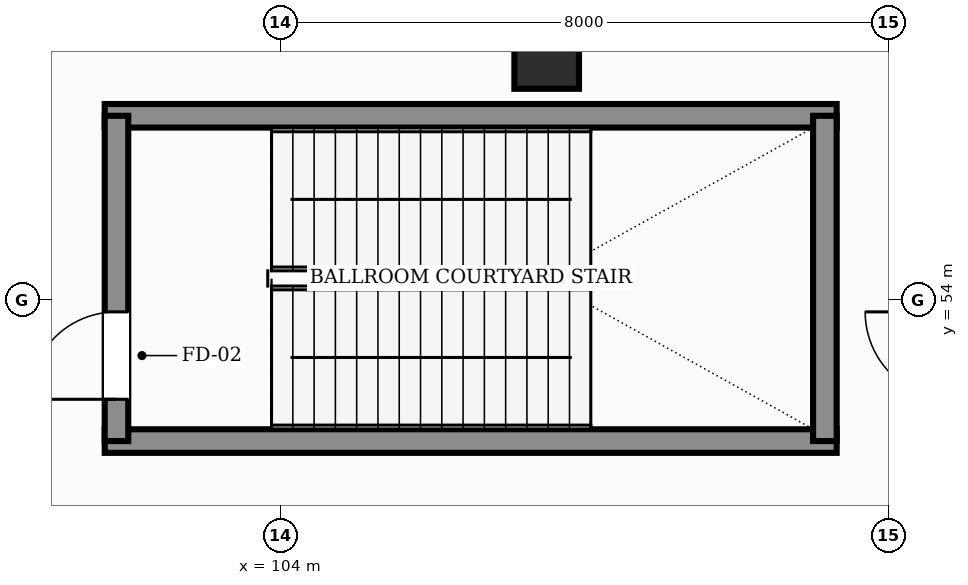
"""IFC4 building model, lengths in metres.
Left out: names, types, materials, properties, quantities, classifications, styles, units other than length and angle.
Written with IfcOpenShell. Run it as: python <this file> out.ifc"""

import sys

from ifc_helpers import new_model, si_unit, direction, frame, frame_2d, origin, origin_2d, place, context, subcontext, project, spatial, rectangle, extrude, element, fill, save


model = new_model("IFC4")
c1 = context("Model", 3, precision=1e-05, world=origin(), true_north=direction((0.0, 1.0)))
c2 = subcontext(c1, "Body", "Model", "MODEL_VIEW")
j1 = project(units=[si_unit("LENGTHUNIT", "METRE"), si_unit("PLANEANGLEUNIT", "RADIAN")], contexts=[c1])
p1 = place(None, origin())
s1 = spatial("IfcSite", under=j1, at=p1, CompositionType="ELEMENT")
p2 = place(p1, origin())
s2 = spatial("IfcBuilding", under=s1, at=p2, CompositionType="ELEMENT")
p3 = place(p2, origin())
s3 = spatial("IfcBuildingStorey", under=s2, at=p3, CompositionType="ELEMENT", Elevation=0.0)
p4 = place(p3, frame((107.5, 57.2, 0.0), z_axis=(0.0, 0.0, 1.0), x_axis=(1.0, 0.0, 0.0)))
e1 = element("IfcColumn", 1, at=p4, inside=s3, PredefinedType="COLUMN", context=c2, shape_type="SweptSolid", body=[
    extrude(rectangle(XDim=0.85, YDim=0.85, at=origin_2d()), origin(), (0.0, 0.0, 1.0), 6.0),
])
for number, where, z_axis, x_axis in (
    (2, (101.685, 52.14, 0.0), (0.0, 0.0, 1.0), (1.0, 0.0, 0.0)),
    (3, (101.685, 56.42, 0.0), (0.0, 0.0, 1.0), (1.0, 0.0, 0.0)),
):
    element("IfcWall", number, at=place(p3, frame(where, z_axis=z_axis, x_axis=x_axis)), inside=s3, PredefinedType="SHEAR", context=c2, shape_type="SweptSolid", body=[
        extrude(rectangle(XDim=9.63, YDim=0.31, at=frame_2d((4.815, 0.0))), origin(), (0.0, 0.0, 1.0), 6.0),
    ])
p5 = place(p3, frame((101.84, 52.14, 0.0), z_axis=(0.0, 0.0, 1.0), x_axis=(0.0, 1.0, 0.0)))
e4 = element("IfcWall", 4, at=p5, inside=s3, PredefinedType="SHEAR", context=c2, shape_type="SweptSolid", body=[
    extrude(rectangle(XDim=4.28, YDim=0.31, at=frame_2d((2.14, 0.0))), origin(), (0.0, 0.0, 1.0), 6.0),
])
p6 = place(p5, frame((0.55, 0.0, 0.0)))
e5 = element("IfcOpeningElement", 5, at=p6, cuts=e4, PredefinedType="OPENING", context=c2, shape_type="SweptSolid", body=[
    extrude(rectangle(XDim=1.15, YDim=2.2, at=frame_2d((0.575, 1.1))), frame((0.0, 0.165, 0.0), z_axis=(0.0, -1.0, 0.0), x_axis=(1.0, 0.0, 0.0)), (0.0, 0.0, 1.0), 0.33),
])
p7 = place(p3, frame((111.16, 52.14, 0.0), z_axis=(0.0, 0.0, 1.0), x_axis=(0.0, 1.0, 0.0)))
e6 = element("IfcWall", 6, at=p7, inside=s3, PredefinedType="SHEAR", context=c2, shape_type="SweptSolid", body=[
    extrude(rectangle(XDim=4.28, YDim=0.31, at=frame_2d((2.14, 0.0))), origin(), (0.0, 0.0, 1.0), 6.0),
])
p8 = place(p6, origin())
e7 = element("IfcDoor", 7, at=p8, inside=s3, OperationType="SINGLE_SWING_LEFT", PredefinedType="DOOR", context=c2, shape_type="SweptSolid", body=[
    extrude(rectangle(XDim=1.15, YDim=2.2, at=frame_2d((0.575, 1.1))), frame((0.0, 0.025, 0.0), z_axis=(0.0, -1.0, 0.0), x_axis=(1.0, 0.0, 0.0)), (0.0, 0.0, 1.0), 0.05),
])
fill(e5, e7)
save(model, sys.argv[1])
